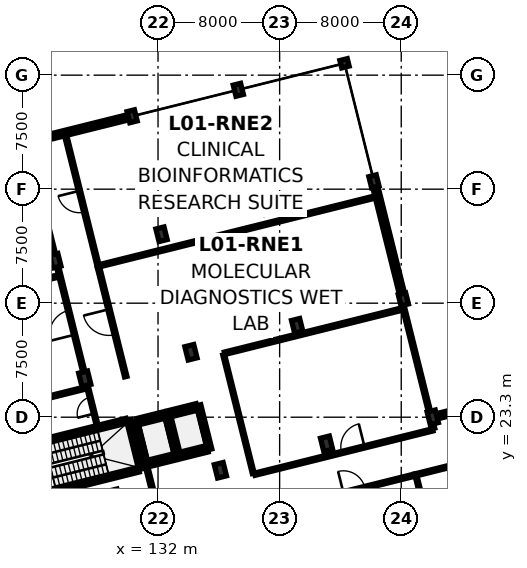
"""IFC4 building model, lengths in metres.
Left out: names, types, materials, properties, quantities, classifications, styles, units other than length and angle.
Written with IfcOpenShell. Run it as: python <this file> out.ifc"""

import sys

from ifc_helpers import new_model, si_unit, direction, frame, frame_2d, origin, origin_2d, place, context, subcontext, project, spatial, rectangle, extrude, element, fill, save


model = new_model("IFC4")
c1 = context("Model", 3, precision=1e-05, world=origin(), true_north=direction((0.0, 1.0)))
c2 = subcontext(c1, "Body", "Model", "MODEL_VIEW")
j1 = project(units=[si_unit("LENGTHUNIT", "METRE"), si_unit("PLANEANGLEUNIT", "RADIAN")], contexts=[c1])
p1 = place(None, origin())
s1 = spatial("IfcSite", under=j1, at=p1, CompositionType="ELEMENT")
p2 = place(p1, origin())
s2 = spatial("IfcBuilding", under=s1, at=p2, CompositionType="ELEMENT")
p3 = place(p2, frame((0.0, 0.0, 5.0)))
s3 = spatial("IfcBuildingStorey", under=s2, at=p3, CompositionType="ELEMENT", Elevation=5.0)
p4 = place(p3, frame((127.18, 25.829, 0.0), z_axis=(0.0, 0.0, 1.0), x_axis=(0.970295726276, 0.2419218956, 0.0)))
e1 = element("IfcColumn", 1, at=p4, inside=s3, PredefinedType="COLUMN", context=c2, shape_type="SweptSolid", body=[
    extrude(rectangle(XDim=0.6, YDim=0.9, at=origin_2d()), origin(), (0.0, 0.0, 1.0), 4.2),
])
p5 = place(p3, frame((125.245, 33.591, 0.0), z_axis=(0.0, 0.0, 1.0), x_axis=(0.970295726276, 0.2419218956, 0.0)))
e2 = element("IfcColumn", 2, at=p5, inside=s3, PredefinedType="COLUMN", context=c2, shape_type="SweptSolid", body=[
    extrude(rectangle(XDim=0.55, YDim=0.85, at=origin_2d()), origin(), (0.0, 0.0, 1.0), 4.2),
])
for number, where, z_axis, x_axis in (
    (3, (136.102, 19.808, 0.0), (0.0, 0.0, 1.0), (0.97, 0.242, 0.0)),
    (4, (134.166, 27.571, 0.0), (0.0, 0.0, 1.0), (0.97, 0.242, 0.0)),
):
    element("IfcColumn", number, at=place(p3, frame(where, z_axis=z_axis, x_axis=x_axis)), inside=s3, PredefinedType="COLUMN", context=c2, shape_type="SweptSolid", body=[
        extrude(rectangle(XDim=0.6, YDim=0.9, at=origin_2d()), origin(), (0.0, 0.0, 1.0), 4.2),
    ])
p6 = place(p3, frame((132.231, 35.333, 0.0), z_axis=(0.0, 0.0, 1.0), x_axis=(0.970295726276, 0.2419218956, 0.0)))
e5 = element("IfcColumn", 5, at=p6, inside=s3, PredefinedType="COLUMN", context=c2, shape_type="SweptSolid", body=[
    extrude(rectangle(XDim=0.55, YDim=0.85, at=origin_2d()), origin(), (0.0, 0.0, 1.0), 4.2),
])
p7 = place(p3, frame((130.295, 43.095, 0.0), z_axis=(0.0, 0.0, 1.0), x_axis=(0.970295726276, 0.2419218956, 0.0)))
e6 = element("IfcColumn", 6, at=p7, inside=s3, PredefinedType="COLUMN", context=c2, shape_type="SweptSolid", body=[
    extrude(rectangle(XDim=0.5, YDim=0.75, at=origin_2d()), origin(), (0.0, 0.0, 1.0), 4.2),
])
p8 = place(p3, frame((143.088, 21.55, 0.0), z_axis=(0.0, 0.0, 1.0), x_axis=(0.970295726276, 0.2419218956, 0.0)))
e7 = element("IfcColumn", 7, at=p8, inside=s3, PredefinedType="COLUMN", context=c2, shape_type="SweptSolid", body=[
    extrude(rectangle(XDim=0.6, YDim=0.9, at=origin_2d()), origin(), (0.0, 0.0, 1.0), 4.2),
])
p9 = place(p3, frame((141.152, 29.312, 0.0), z_axis=(0.0, 0.0, 1.0), x_axis=(0.970295726276, 0.2419218956, 0.0)))
e8 = element("IfcColumn", 8, at=p9, inside=s3, PredefinedType="COLUMN", context=c2, shape_type="SweptSolid", body=[
    extrude(rectangle(XDim=0.55, YDim=0.85, at=origin_2d()), origin(), (0.0, 0.0, 1.0), 4.2),
])
for number, where, z_axis, x_axis in (
    (9, (139.217, 37.075, 0.0), (0.0, 0.0, 1.0), (0.97, 0.242, 0.0)),
    (10, (137.281, 44.837, 0.0), (0.0, 0.0, 1.0), (0.97, 0.242, 0.0)),
):
    element("IfcColumn", number, at=place(p3, frame(where, z_axis=z_axis, x_axis=x_axis)), inside=s3, PredefinedType="COLUMN", context=c2, shape_type="SweptSolid", body=[
        extrude(rectangle(XDim=0.5, YDim=0.75, at=origin_2d()), origin(), (0.0, 0.0, 1.0), 4.2),
    ])
p10 = place(p3, frame((150.074, 23.292, 0.0), z_axis=(0.0, 0.0, 1.0), x_axis=(0.970295726276, 0.2419218956, 0.0)))
e11 = element("IfcColumn", 11, at=p10, inside=s3, PredefinedType="COLUMN", context=c2, shape_type="SweptSolid", body=[
    extrude(rectangle(XDim=0.55, YDim=0.85, at=origin_2d()), origin(), (0.0, 0.0, 1.0), 4.2),
])
for number, where, z_axis, x_axis in (
    (12, (148.138, 31.054, 0.0), (0.0, 0.0, 1.0), (0.97, 0.242, 0.0)),
    (13, (146.203, 38.817, 0.0), (0.0, 0.0, 1.0), (0.97, 0.242, 0.0)),
):
    element("IfcColumn", number, at=place(p3, frame(where, z_axis=z_axis, x_axis=x_axis)), inside=s3, PredefinedType="COLUMN", context=c2, shape_type="SweptSolid", body=[
        extrude(rectangle(XDim=0.5, YDim=0.75, at=origin_2d()), origin(), (0.0, 0.0, 1.0), 4.2),
    ])
p11 = place(p3, frame((144.268, 46.579, 0.0), z_axis=(0.0, 0.0, 1.0), x_axis=(0.970295726276, 0.2419218956, 0.0)))
e14 = element("IfcColumn", 14, at=p11, inside=s3, PredefinedType="COLUMN", context=c2, shape_type="SweptSolid", body=[
    extrude(rectangle(XDim=0.5, YDim=0.5, at=origin_2d()), origin(), (0.0, 0.0, 1.0), 5.596),
])
p12 = place(p3, frame((150.341, 23.359, 0.0), z_axis=(0.0, 0.0, 1.0), x_axis=(0.970299354279, 0.241907344009, 0.0)))
e15 = element("IfcWall", 15, at=p12, inside=s3, PredefinedType="SOLIDWALL", context=c2, shape_type="SweptSolid", body=[
    extrude(rectangle(XDim=6.675, YDim=0.35, at=frame_2d((3.337, 0.0))), origin(), (0.0, 0.0, 1.0), 3.485),
])
p13 = place(p12, frame((2.712, 0.0, 0.9)))
e16 = element("IfcOpeningElement", 16, at=p13, cuts=e15, PredefinedType="OPENING", context=c2, shape_type="SweptSolid", body=[
    extrude(rectangle(XDim=1.25, YDim=1.5, at=frame_2d((0.625, 0.75))), frame((0.0, 0.187, 0.0), z_axis=(0.0, -1.0, 0.0), x_axis=(1.0, 0.0, 0.0)), (0.0, 0.0, 1.0), 0.374),
])
p14 = place(p3, frame((123.552, 41.414, 0.0), z_axis=(0.0, 0.0, 1.0), x_axis=(0.970296633454, 0.241918257079, 0.0)))
e17 = element("IfcWall", 17, at=p14, inside=s3, PredefinedType="SOLIDWALL", context=c2, shape_type="SweptSolid", body=[
    extrude(rectangle(XDim=6.7, YDim=0.35, at=frame_2d((3.35, 0.0))), origin(), (0.0, 0.0, 1.0), 3.385),
])
p15 = place(p3, frame((146.294, 38.453, 0.0), z_axis=(0.0, 0.0, 1.0), x_axis=(0.241917549853, -0.970296809782, 0.0)))
e18 = element("IfcWall", 18, at=p15, inside=s3, PredefinedType="SOLIDWALL", context=c2, shape_type="SweptSolid", body=[
    extrude(rectangle(XDim=7.25, YDim=0.35, at=frame_2d((3.625, 0.0))), origin(), (0.0, 0.0, 1.0), 3.485),
])
p16 = place(p3, frame((123.75, 18.11, 0.0), z_axis=(0.0, 0.0, 1.0), x_axis=(0.970294108333, 0.241928384724, 0.0)))
e19 = element("IfcWall", 19, at=p16, inside=s3, PredefinedType="SHEAR", context=c2, shape_type="SweptSolid", body=[
    extrude(rectangle(XDim=7.19, YDim=0.32, at=frame_2d((3.595, 0.0))), origin(), (0.0, 0.0, 1.0), 4.2),
])
p17 = place(p3, frame((130.887, 19.889, 0.0), z_axis=(0.0, 0.0, 1.0), x_axis=(-0.241947258837, 0.970289402158, 0.0)))
e20 = element("IfcWall", 20, at=p17, inside=s3, PredefinedType="SHEAR", context=c2, shape_type="SweptSolid", body=[
    extrude(rectangle(XDim=3.32, YDim=0.32, at=frame_2d((1.66, 0.0))), origin(), (0.0, 0.0, 1.0), 4.2),
])
p18 = place(p3, frame((129.924, 23.071, 0.0), z_axis=(0.0, 0.0, 1.0), x_axis=(-0.970294108333, -0.241928384724, 0.0)))
e21 = element("IfcWall", 21, at=p18, inside=s3, PredefinedType="SHEAR", context=c2, shape_type="SweptSolid", body=[
    extrude(rectangle(XDim=7.19, YDim=0.32, at=frame_2d((3.595, 0.0))), origin(), (0.0, 0.0, 1.0), 4.2),
])
p19 = place(p3, frame((131.363, 20.176, 0.0), z_axis=(0.0, 0.0, 1.0), x_axis=(0.970284587517, 0.241966566341, 0.0)))
e22 = element("IfcWall", 22, at=p19, inside=s3, PredefinedType="SHEAR", context=c2, shape_type="SweptSolid", body=[
    extrude(rectangle(XDim=1.817, YDim=0.28, at=frame_2d((0.909, 0.0))), origin(), (0.0, 0.0, 1.0), 4.2),
])
p20 = place(p3, frame((133.267, 20.651, 0.0), z_axis=(0.0, 0.0, 1.0), x_axis=(-0.241921647353, 0.970295788171, 0.0)))
e23 = element("IfcWall", 23, at=p20, inside=s3, PredefinedType="SHEAR", context=c2, shape_type="SweptSolid", body=[
    extrude(rectangle(XDim=2.994, YDim=0.28, at=frame_2d((1.497, 0.0))), origin(), (0.0, 0.0, 1.0), 4.2),
])
p21 = place(p3, frame((132.402, 23.521, 0.0), z_axis=(0.0, 0.0, 1.0), x_axis=(-0.970284587517, -0.241966566341, 0.0)))
e24 = element("IfcWall", 24, at=p21, inside=s3, PredefinedType="SHEAR", context=c2, shape_type="SweptSolid", body=[
    extrude(rectangle(XDim=1.817, YDim=0.28, at=frame_2d((0.909, 0.0))), origin(), (0.0, 0.0, 1.0), 4.2),
])
p22 = place(p21, frame((0.259, 0.0, 0.0)))
e25 = element("IfcOpeningElement", 25, at=p22, cuts=e24, PredefinedType="OPENING", context=c2, shape_type="SweptSolid", body=[
    extrude(rectangle(XDim=1.3, YDim=2.2, at=frame_2d((0.65, 1.1))), frame((0.0, 0.152, 0.0), z_axis=(0.0, -1.0, 0.0), x_axis=(1.0, 0.0, 0.0)), (0.0, 0.0, 1.0), 0.304),
])
p23 = place(p3, frame((130.498, 23.046, 0.0), z_axis=(0.0, 0.0, 1.0), x_axis=(0.241921647353, -0.970295788171, 0.0)))
e26 = element("IfcWall", 26, at=p23, inside=s3, PredefinedType="SHEAR", context=c2, shape_type="SweptSolid", body=[
    extrude(rectangle(XDim=2.994, YDim=0.28, at=frame_2d((1.497, 0.0))), origin(), (0.0, 0.0, 1.0), 4.2),
])
p24 = place(p3, frame((133.408, 20.686, 0.0), z_axis=(0.0, 0.0, 1.0), x_axis=(0.970285190026, 0.241964150272, 0.0)))
e27 = element("IfcWall", 27, at=p24, inside=s3, PredefinedType="SHEAR", context=c2, shape_type="SweptSolid", body=[
    extrude(rectangle(XDim=1.91, YDim=0.28, at=frame_2d((0.955, 0.0))), origin(), (0.0, 0.0, 1.0), 4.2),
])
p25 = place(p3, frame((135.402, 21.183, 0.0), z_axis=(0.0, 0.0, 1.0), x_axis=(-0.241921647353, 0.970295788171, 0.0)))
e28 = element("IfcWall", 28, at=p25, inside=s3, PredefinedType="SHEAR", context=c2, shape_type="SweptSolid", body=[
    extrude(rectangle(XDim=2.994, YDim=0.28, at=frame_2d((1.497, 0.0))), origin(), (0.0, 0.0, 1.0), 4.2),
])
p26 = place(p3, frame((134.537, 24.053, 0.0), z_axis=(0.0, 0.0, 1.0), x_axis=(-0.970285190026, -0.241964150272, 0.0)))
e29 = element("IfcWall", 29, at=p26, inside=s3, PredefinedType="SHEAR", context=c2, shape_type="SweptSolid", body=[
    extrude(rectangle(XDim=1.91, YDim=0.28, at=frame_2d((0.955, 0.0))), origin(), (0.0, 0.0, 1.0), 4.2),
])
p27 = place(p26, frame((0.305, 0.0, 0.0)))
e30 = element("IfcOpeningElement", 30, at=p27, cuts=e29, PredefinedType="OPENING", context=c2, shape_type="SweptSolid", body=[
    extrude(rectangle(XDim=1.3, YDim=2.2, at=frame_2d((0.65, 1.1))), frame((0.0, 0.152, 0.0), z_axis=(0.0, -1.0, 0.0), x_axis=(1.0, 0.0, 0.0)), (0.0, 0.0, 1.0), 0.304),
])
p28 = place(p3, frame((127.995, 22.767, 0.0), z_axis=(0.0, 0.0, 1.0), x_axis=(-0.241877500256, 0.9703067942, 0.0)))
e31 = element("IfcWall", 31, at=p28, inside=s3, PredefinedType="PARTITIONING", context=c2, shape_type="SweptSolid", body=[
    extrude(rectangle(XDim=2.706, YDim=0.125, at=frame_2d((1.353, 0.0))), origin(), (0.0, 0.0, 1.0), 4.2),
])
p29 = place(p28, frame((0.793, 0.0, 0.0)))
e32 = element("IfcOpeningElement", 32, at=p29, cuts=e31, PredefinedType="OPENING", context=c2, shape_type="SweptSolid", body=[
    extrude(rectangle(XDim=1.12, YDim=2.2, at=frame_2d((0.56, 1.1))), frame((0.0, 0.074, 0.0), z_axis=(0.0, -1.0, 0.0), x_axis=(1.0, 0.0, 0.0)), (0.0, 0.0, 1.0), 0.149),
])
p30 = place(p3, frame((140.928, 17.508, 0.0), z_axis=(0.0, 0.0, 1.0), x_axis=(0.970293149657, 0.241932229621, 0.0)))
e33 = element("IfcWall", 33, at=p30, inside=s3, PredefinedType="PARTITIONING", context=c2, shape_type="SweptSolid", body=[
    extrude(rectangle(XDim=8.188, YDim=0.15, at=frame_2d((4.094, 0.0))), origin(), (0.0, 0.0, 1.0), 3.385),
])
p31 = place(p30, frame((3.369, 0.0, 0.0)))
e34 = element("IfcOpeningElement", 34, at=p31, cuts=e33, PredefinedType="OPENING", context=c2, shape_type="SweptSolid", body=[
    extrude(rectangle(XDim=1.45, YDim=2.26, at=frame_2d((0.725, 1.13))), frame((0.0, 0.087, 0.0), z_axis=(0.0, -1.0, 0.0), x_axis=(1.0, 0.0, 0.0)), (0.0, 0.0, 1.0), 0.174),
])
p32 = place(p3, frame((148.885, 19.491, 0.0), z_axis=(0.0, 0.0, 1.0), x_axis=(0.970294203895, 0.241928001454, 0.0)))
e35 = element("IfcWall", 35, at=p32, inside=s3, PredefinedType="PARTITIONING", context=c2, shape_type="SweptSolid", body=[
    extrude(rectangle(XDim=9.171, YDim=0.15, at=frame_2d((4.585, 0.0))), origin(), (0.0, 0.0, 1.0), 3.485),
])
p33 = place(p32, frame((3.835, 0.0, 0.0)))
e36 = element("IfcOpeningElement", 36, at=p33, cuts=e35, PredefinedType="OPENING", context=c2, shape_type="SweptSolid", body=[
    extrude(rectangle(XDim=1.5, YDim=2.28, at=frame_2d((0.75, 1.14))), frame((0.0, 0.087, 0.0), z_axis=(0.0, -1.0, 0.0), x_axis=(1.0, 0.0, 0.0)), (0.0, 0.0, 1.0), 0.174),
])
p34 = place(p3, frame((138.367, 19.549, 0.0), z_axis=(0.0, 0.0, 1.0), x_axis=(0.970292357867, 0.241935405151, 0.0)))
e37 = element("IfcWall", 37, at=p34, inside=s3, PredefinedType="PARTITIONING", context=c2, shape_type="SweptSolid", body=[
    extrude(rectangle(XDim=12.06, YDim=0.15, at=frame_2d((6.03, 0.0))), origin(), (0.0, 0.0, 1.0), 3.385),
])
p35 = place(p34, frame((5.88, 0.0, 0.0)))
e38 = element("IfcOpeningElement", 38, at=p35, cuts=e37, PredefinedType="OPENING", context=c2, shape_type="SweptSolid", body=[
    extrude(rectangle(XDim=1.56, YDim=2.3, at=frame_2d((0.78, 1.15))), frame((0.0, 0.087, 0.0), z_axis=(0.0, -1.0, 0.0), x_axis=(1.0, 0.0, 0.0)), (0.0, 0.0, 1.0), 0.174),
])
p36 = place(p3, frame((127.221, 25.87, 0.0), z_axis=(0.0, 0.0, 1.0), x_axis=(-0.241902639837, 0.970300527074, 0.0)))
e39 = element("IfcWall", 39, at=p36, inside=s3, PredefinedType="PARTITIONING", context=c2, shape_type="SweptSolid", body=[
    extrude(rectangle(XDim=7.533, YDim=0.15, at=frame_2d((3.767, 0.0))), origin(), (0.0, 0.0, 1.0), 3.385),
])
p37 = place(p36, frame((2.941, 0.0, 0.0)))
e40 = element("IfcOpeningElement", 40, at=p37, cuts=e39, PredefinedType="OPENING", context=c2, shape_type="SweptSolid", body=[
    extrude(rectangle(XDim=1.65, YDim=2.32, at=frame_2d((0.825, 1.16))), frame((0.0, 0.087, 0.0), z_axis=(0.0, -1.0, 0.0), x_axis=(1.0, 0.0, 0.0)), (0.0, 0.0, 1.0), 0.174),
])
p38 = place(p3, frame((129.876, 25.97, 0.0), z_axis=(0.0, 0.0, 1.0), x_axis=(-0.241938716353, 0.970291532236, 0.0)))
e41 = element("IfcWall", 41, at=p38, inside=s3, PredefinedType="PARTITIONING", context=c2, shape_type="SweptSolid", body=[
    extrude(rectangle(XDim=7.411, YDim=0.16, at=frame_2d((3.706, 0.0))), origin(), (0.0, 0.0, 1.0), 3.485),
])
p39 = place(p38, frame((2.845, 0.0, 0.0)))
e42 = element("IfcOpeningElement", 42, at=p39, cuts=e41, PredefinedType="OPENING", context=c2, shape_type="SweptSolid", body=[
    extrude(rectangle(XDim=1.72, YDim=2.34, at=frame_2d((0.86, 1.17))), frame((0.0, 0.092, 0.0), z_axis=(0.0, -1.0, 0.0), x_axis=(1.0, 0.0, 0.0)), (0.0, 0.0, 1.0), 0.184),
])
p40 = place(p3, frame((125.28, 33.657, 0.0), z_axis=(0.0, 0.0, 1.0), x_axis=(-0.241913572398, 0.970297801445, 0.0)))
e43 = element("IfcWall", 43, at=p40, inside=s3, PredefinedType="PARTITIONING", context=c2, shape_type="SweptSolid", body=[
    extrude(rectangle(XDim=7.573, YDim=0.15, at=frame_2d((3.787, 0.0))), origin(), (0.0, 0.0, 1.0), 3.385),
])
p41 = place(p40, frame((3.096, 0.0, 0.0)))
e44 = element("IfcOpeningElement", 44, at=p41, cuts=e43, PredefinedType="OPENING", context=c2, shape_type="SweptSolid", body=[
    extrude(rectangle(XDim=1.38, YDim=2.3, at=frame_2d((0.69, 1.15))), frame((0.0, 0.087, 0.0), z_axis=(0.0, -1.0, 0.0), x_axis=(1.0, 0.0, 0.0)), (0.0, 0.0, 1.0), 0.174),
])
p42 = place(p3, frame((128.08, 33.173, 0.0), z_axis=(0.0, 0.0, 1.0), x_axis=(-0.241916302916, 0.970297120672, 0.0)))
e45 = element("IfcWall", 45, at=p42, inside=s3, PredefinedType="PARTITIONING", context=c2, shape_type="SweptSolid", body=[
    extrude(rectangle(XDim=8.905, YDim=0.15, at=frame_2d((4.453, 0.0))), origin(), (0.0, 0.0, 1.0), 3.485),
])
p43 = place(p42, frame((3.733, 0.0, 0.0)))
e46 = element("IfcOpeningElement", 46, at=p43, cuts=e45, PredefinedType="OPENING", context=c2, shape_type="SweptSolid", body=[
    extrude(rectangle(XDim=1.44, YDim=2.32, at=frame_2d((0.72, 1.16))), frame((0.0, 0.087, 0.0), z_axis=(0.0, -1.0, 0.0), x_axis=(1.0, 0.0, 0.0)), (0.0, 0.0, 1.0), 0.174),
])
p44 = place(p3, frame((131.763, 17.99, 0.0), z_axis=(0.0, 0.0, 1.0), x_axis=(-0.241962612769, 0.970285573438, 0.0)))
e47 = element("IfcWall", 47, at=p44, inside=s3, PredefinedType="PARTITIONING", context=c2, shape_type="SweptSolid", body=[
    extrude(rectangle(XDim=2.206, YDim=0.16, at=frame_2d((1.103, 0.0))), origin(), (0.0, 0.0, 1.0), 3.485),
])
p45 = place(p3, frame((120.521, 23.55, 0.0), z_axis=(0.0, 0.0, 1.0), x_axis=(0.970294380964, 0.241927291286, 0.0)))
e48 = element("IfcWall", 48, at=p45, inside=s3, PredefinedType="PARTITIONING", context=c2, shape_type="SweptSolid", body=[
    extrude(rectangle(XDim=6.988, YDim=0.15, at=frame_2d((3.494, 0.0))), origin(), (0.0, 0.0, 1.0), 3.485),
])
p46 = place(p3, frame((150.677, 12.605, 0.0), z_axis=(0.0, 0.0, 1.0), x_axis=(-0.241914380839, 0.970297599885, 0.0)))
e49 = element("IfcWall", 49, at=p46, inside=s3, PredefinedType="PARTITIONING", context=c2, shape_type="SweptSolid", body=[
    extrude(rectangle(XDim=7.028, YDim=0.125, at=frame_2d((3.514, 0.0))), origin(), (0.0, 0.0, 1.0), 3.485),
])
p47 = place(p3, frame((136.383, 27.505, 0.0), z_axis=(0.0, 0.0, 1.0), x_axis=(0.970298155851, 0.241912150896, 0.0)))
e50 = element("IfcWall", 50, at=p47, inside=s3, PredefinedType="PARTITIONING", context=c2, shape_type="SweptSolid", body=[
    extrude(rectangle(XDim=12.163, YDim=0.16, at=frame_2d((6.082, 0.0))), origin(), (0.0, 0.0, 1.0), 3.385),
])
p48 = place(p3, frame((138.264, 19.611, 0.0), z_axis=(0.0, 0.0, 1.0), x_axis=(-0.241920353256, 0.970296110824, 0.0)))
e51 = element("IfcWall", 51, at=p48, inside=s3, PredefinedType="PARTITIONING", context=c2, shape_type="SweptSolid", body=[
    extrude(rectangle(XDim=8.03, YDim=0.125, at=frame_2d((4.015, 0.0))), origin(), (0.0, 0.0, 1.0), 3.485),
])
p49 = place(p3, frame((150.13, 22.569, 0.0), z_axis=(0.0, 0.0, 1.0), x_axis=(-0.241919812841, 0.970296245564, 0.0)))
e52 = element("IfcWall", 52, at=p49, inside=s3, PredefinedType="PARTITIONING", context=c2, shape_type="SweptSolid", body=[
    extrude(rectangle(XDim=8.023, YDim=0.15, at=frame_2d((4.011, 0.0))), origin(), (0.0, 0.0, 1.0), 3.485),
])
p50 = place(p3, frame((118.604, 30.885, 0.0), z_axis=(0.0, 0.0, 1.0), x_axis=(0.970294847648, 0.241925419556, 0.0)))
e53 = element("IfcWall", 53, at=p50, inside=s3, PredefinedType="PARTITIONING", context=c2, shape_type="SweptSolid", body=[
    extrude(rectangle(XDim=7.061, YDim=0.16, at=frame_2d((3.531, 0.0))), origin(), (0.0, 0.0, 1.0), 3.385),
])
p51 = place(p3, frame((128.147, 33.264, 0.0), z_axis=(0.0, 0.0, 1.0), x_axis=(0.970293031027, 0.241932705395, 0.0)))
e54 = element("IfcWall", 54, at=p51, inside=s3, PredefinedType="PARTITIONING", context=c2, shape_type="SweptSolid", body=[
    extrude(rectangle(XDim=18.676, YDim=0.15, at=frame_2d((9.338, 0.0))), origin(), (0.0, 0.0, 1.0), 3.385),
])
p52 = place(p22, origin())
e55 = element("IfcDoor", 55, at=p52, inside=s3, OperationType="SLIDING_TO_LEFT", PredefinedType="DOOR", context=c2, shape_type="SweptSolid", body=[
    extrude(rectangle(XDim=1.3, YDim=2.2, at=frame_2d((0.65, 1.1))), frame((0.0, 0.025, 0.0), z_axis=(0.0, -1.0, 0.0), x_axis=(1.0, 0.0, 0.0)), (0.0, 0.0, 1.0), 0.05),
])
fill(e25, e55)
p53 = place(p27, origin())
e56 = element("IfcDoor", 56, at=p53, inside=s3, OperationType="SLIDING_TO_RIGHT", PredefinedType="DOOR", context=c2, shape_type="SweptSolid", body=[
    extrude(rectangle(XDim=1.3, YDim=2.2, at=frame_2d((0.65, 1.1))), frame((0.0, 0.025, 0.0), z_axis=(0.0, -1.0, 0.0), x_axis=(1.0, 0.0, 0.0)), (0.0, 0.0, 1.0), 0.05),
])
fill(e30, e56)
p54 = place(p29, origin())
e57 = element("IfcDoor", 57, at=p54, inside=s3, OperationType="SINGLE_SWING_LEFT", PredefinedType="DOOR", context=c2, shape_type="SweptSolid", body=[
    extrude(rectangle(XDim=1.12, YDim=2.2, at=frame_2d((0.56, 1.1))), frame((0.0, 0.025, 0.0), z_axis=(0.0, -1.0, 0.0), x_axis=(1.0, 0.0, 0.0)), (0.0, 0.0, 1.0), 0.05),
])
fill(e32, e57)
p55 = place(p31, origin())
e58 = element("IfcDoor", 58, at=p55, inside=s3, OperationType="SINGLE_SWING_LEFT", PredefinedType="DOOR", context=c2, shape_type="SweptSolid", body=[
    extrude(rectangle(XDim=1.45, YDim=2.26, at=frame_2d((0.725, 1.13))), frame((0.0, 0.025, 0.0), z_axis=(0.0, -1.0, 0.0), x_axis=(1.0, 0.0, 0.0)), (0.0, 0.0, 1.0), 0.05),
])
fill(e34, e58)
p56 = place(p35, origin())
e59 = element("IfcDoor", 59, at=p56, inside=s3, OperationType="SINGLE_SWING_RIGHT", PredefinedType="DOOR", context=c2, shape_type="SweptSolid", body=[
    extrude(rectangle(XDim=1.56, YDim=2.3, at=frame_2d((0.78, 1.15))), frame((0.0, 0.025, 0.0), z_axis=(0.0, -1.0, 0.0), x_axis=(1.0, 0.0, 0.0)), (0.0, 0.0, 1.0), 0.05),
])
fill(e38, e59)
p57 = place(p37, origin())
e60 = element("IfcDoor", 60, at=p57, inside=s3, OperationType="SINGLE_SWING_LEFT", PredefinedType="DOOR", context=c2, shape_type="SweptSolid", body=[
    extrude(rectangle(XDim=1.65, YDim=2.32, at=frame_2d((0.825, 1.16))), frame((0.0, 0.025, 0.0), z_axis=(0.0, -1.0, 0.0), x_axis=(1.0, 0.0, 0.0)), (0.0, 0.0, 1.0), 0.05),
])
fill(e40, e60)
p58 = place(p39, origin())
e61 = element("IfcDoor", 61, at=p58, inside=s3, OperationType="SINGLE_SWING_RIGHT", PredefinedType="DOOR", context=c2, shape_type="SweptSolid", body=[
    extrude(rectangle(XDim=1.72, YDim=2.34, at=frame_2d((0.86, 1.17))), frame((0.0, 0.025, 0.0), z_axis=(0.0, -1.0, 0.0), x_axis=(1.0, 0.0, 0.0)), (0.0, 0.0, 1.0), 0.05),
])
fill(e42, e61)
p59 = place(p43, origin())
e62 = element("IfcDoor", 62, at=p59, inside=s3, OperationType="SINGLE_SWING_RIGHT", PredefinedType="DOOR", context=c2, shape_type="SweptSolid", body=[
    extrude(rectangle(XDim=1.44, YDim=2.32, at=frame_2d((0.72, 1.16))), frame((0.0, 0.025, 0.0), z_axis=(0.0, -1.0, 0.0), x_axis=(1.0, 0.0, 0.0)), (0.0, 0.0, 1.0), 0.05),
])
fill(e46, e62)
save(model, sys.argv[1])
